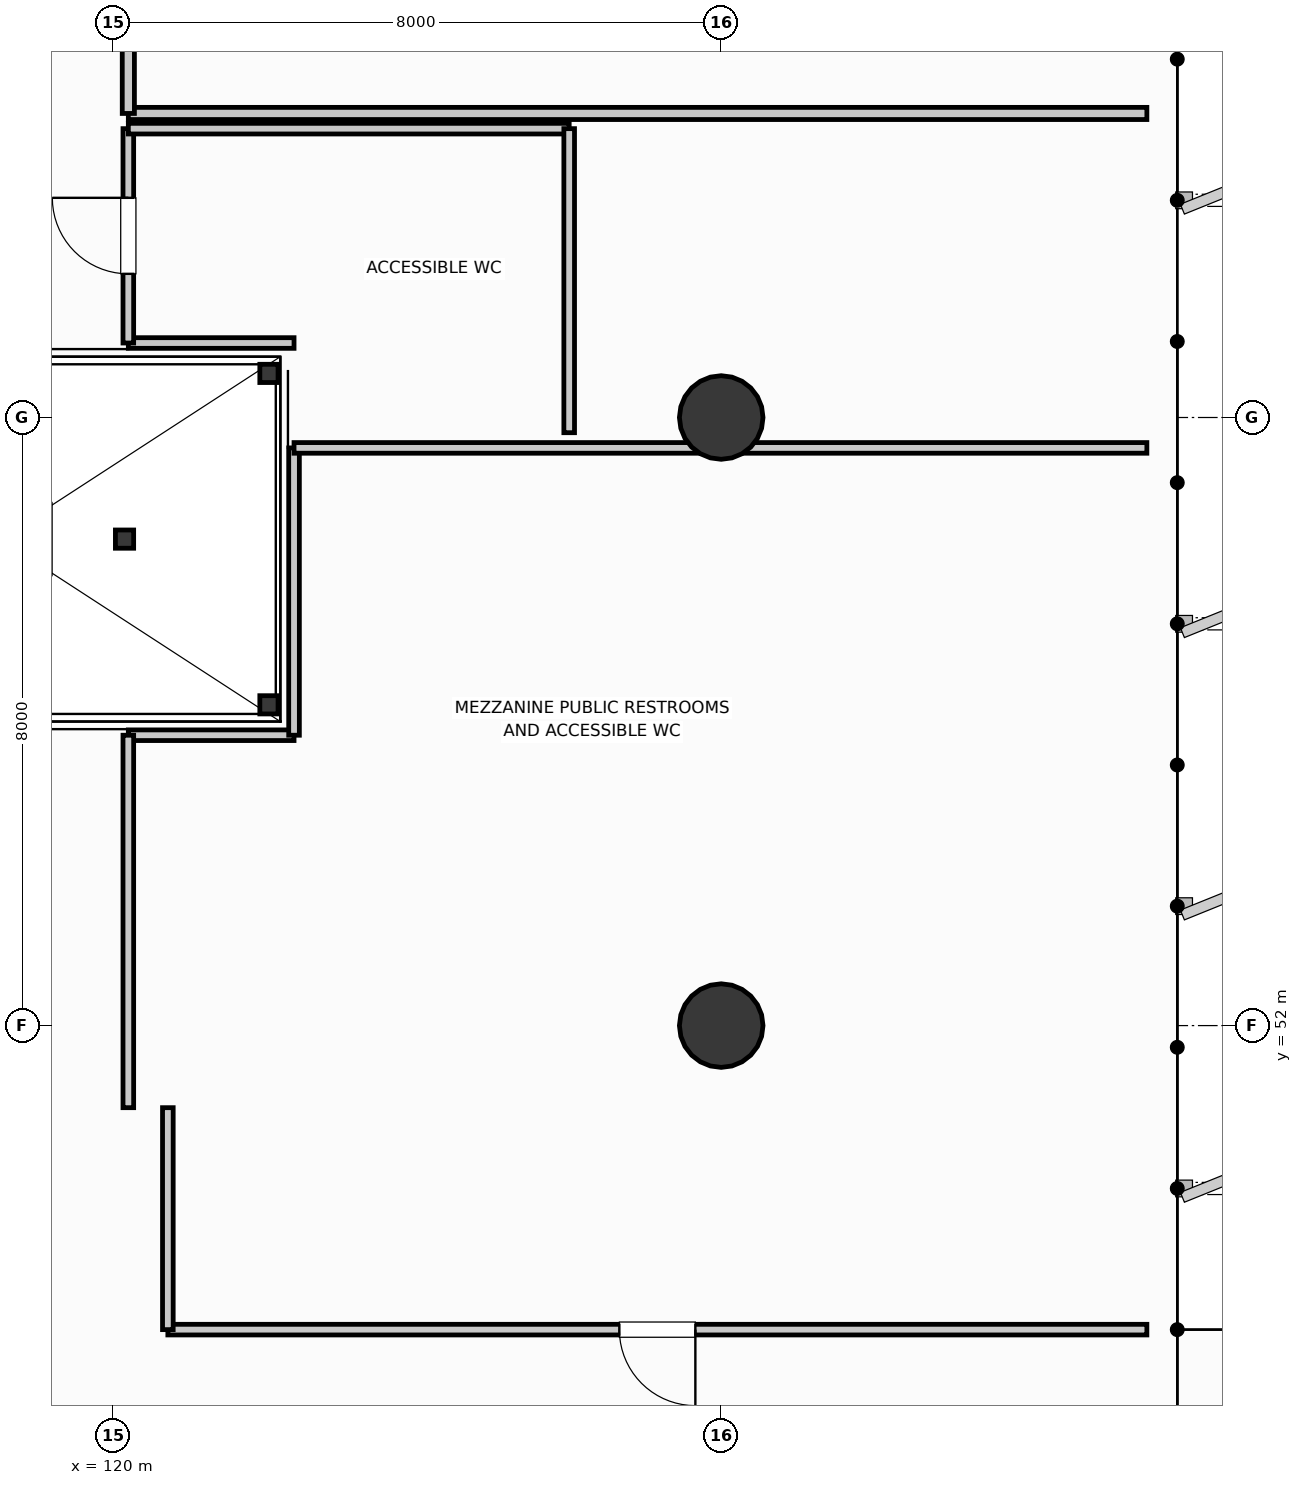
"""IFC4 building model, lengths in metres.
Left out: names, types, materials, properties, quantities, classifications, styles, units other than length and angle.
Written with IfcOpenShell. Run it as: python <this file> out.ifc"""

import sys

from ifc_helpers import new_model, si_unit, direction, frame, frame_2d, origin, origin_2d, place, context, subcontext, project, spatial, rectangle, circle, i_section, extrude, element, fill, save


model = new_model("IFC4")
c1 = context("Model", 3, precision=1e-05, world=origin(), true_north=direction((0.0, 1.0)))
c2 = subcontext(c1, "Body", "Model", "MODEL_VIEW")
j1 = project(units=[si_unit("LENGTHUNIT", "METRE"), si_unit("PLANEANGLEUNIT", "RADIAN")], contexts=[c1])
p1 = place(None, origin())
s1 = spatial("IfcSite", under=j1, at=p1, CompositionType="ELEMENT")
p2 = place(p1, origin())
s2 = spatial("IfcBuilding", under=s1, at=p2, CompositionType="ELEMENT")
p3 = place(p2, frame((0.0, 0.0, 6.0)))
s3 = spatial("IfcBuildingStorey", under=s2, at=p3, CompositionType="ELEMENT", Elevation=6.0)
for number, where, z_axis, x_axis in (
    (1, (128.0, 52.0, 0.0), (0.0, 0.0, 1.0), (1.0, 0.0, 0.0)),
    (2, (128.0, 60.0, 0.0), (0.0, 0.0, 1.0), (1.0, 0.0, 0.0)),
):
    element("IfcColumn", number, at=place(p3, frame(where, z_axis=z_axis, x_axis=x_axis)), inside=s3, PredefinedType="COLUMN", context=c2, shape_type="SweptSolid", body=[
        extrude(circle(Radius=0.55, at=origin_2d()), origin(), (0.0, 0.0, 1.0), 5.4),
    ])
for number, where, z_axis, x_axis in (
    (3, (122.05, 56.22, 0.0), (0.0, 0.0, 1.0), (1.0, 0.0, 0.0)),
    (4, (122.05, 60.58, 0.0), (0.0, 0.0, 1.0), (1.0, 0.0, 0.0)),
    (5, (120.15, 58.4, 0.0), (0.0, 0.0, 1.0), (1.0, 0.0, 0.0)),
):
    element("IfcColumn", number, at=place(p3, frame(where, z_axis=z_axis, x_axis=x_axis)), inside=s3, PredefinedType="COLUMN", context=c2, shape_type="SweptSolid", body=[
        extrude(i_section(OverallWidth=0.24, OverallDepth=0.24, WebThickness=0.01, FlangeThickness=0.017, FilletRadius=0.021, at=origin_2d()), origin(), (0.0, 0.0, 1.0), 2.7),
    ])
p4 = place(p3, frame((120.2, 55.82, 0.0), z_axis=(0.0, 0.0, 1.0), x_axis=(1.0, 0.0, 0.0)))
e6 = element("IfcWall", 6, at=p4, inside=s3, PredefinedType="PARTITIONING", context=c2, shape_type="SweptSolid", body=[
    extrude(rectangle(XDim=2.18, YDim=0.14, at=frame_2d((1.09, 0.0))), origin(), (0.0, 0.0, 1.0), 5.02),
])
p5 = place(p3, frame((122.38, 55.82, 0.0), z_axis=(0.0, 0.0, 1.0), x_axis=(0.0, 1.0, 0.0)))
e7 = element("IfcWall", 7, at=p5, inside=s3, PredefinedType="PARTITIONING", context=c2, shape_type="SweptSolid", body=[
    extrude(rectangle(XDim=3.78, YDim=0.14, at=frame_2d((1.89, 0.0))), origin(), (0.0, 0.0, 1.0), 5.02),
])
p6 = place(p3, frame((122.38, 59.6, 0.0), z_axis=(0.0, 0.0, 1.0), x_axis=(1.0, 0.0, 0.0)))
e8 = element("IfcWall", 8, at=p6, inside=s3, PredefinedType="PARTITIONING", context=c2, shape_type="SweptSolid", body=[
    extrude(rectangle(XDim=11.22, YDim=0.14, at=frame_2d((5.61, 0.0))), origin(), (0.0, 0.0, 1.0), 4.215),
])
p7 = place(p3, frame((133.6, 48.0, 0.0), z_axis=(0.0, 0.0, 1.0), x_axis=(-1.0, 0.0, 0.0)))
e9 = element("IfcWall", 9, at=p7, inside=s3, PredefinedType="PARTITIONING", context=c2, shape_type="SweptSolid", body=[
    extrude(rectangle(XDim=12.88, YDim=0.14, at=frame_2d((6.44, 0.0))), origin(), (0.0, 0.0, 1.0), 4.215),
])
p8 = place(p7, frame((5.94, 0.0, 0.0)))
e10 = element("IfcOpeningElement", 10, at=p8, cuts=e9, PredefinedType="OPENING", context=c2, shape_type="SweptSolid", body=[
    extrude(rectangle(XDim=1.0, YDim=2.15, at=frame_2d((0.5, 1.075))), frame((0.0, 0.08, 0.0), z_axis=(0.0, -1.0, 0.0), x_axis=(1.0, 0.0, 0.0)), (0.0, 0.0, 1.0), 0.16),
])
p9 = place(p3, frame((120.72, 48.0, 0.0), z_axis=(0.0, 0.0, 1.0), x_axis=(0.0, 1.0, 0.0)))
e11 = element("IfcWall", 11, at=p9, inside=s3, PredefinedType="PARTITIONING", context=c2, shape_type="SweptSolid", body=[
    extrude(rectangle(XDim=2.92, YDim=0.14, at=frame_2d((1.46, 0.0))), origin(), (0.0, 0.0, 1.0), 5.02),
])
p10 = place(p3, frame((120.2, 50.92, 0.0), z_axis=(0.0, 0.0, 1.0), x_axis=(0.0, 1.0, 0.0)))
e12 = element("IfcWall", 12, at=p10, inside=s3, PredefinedType="PARTITIONING", context=c2, shape_type="SweptSolid", body=[
    extrude(rectangle(XDim=4.9, YDim=0.14, at=frame_2d((2.45, 0.0))), origin(), (0.0, 0.0, 1.0), 3.565),
])
p11 = place(p3, frame((122.38, 60.98, 0.0), z_axis=(0.0, 0.0, 1.0), x_axis=(-1.0, 0.0, 0.0)))
e13 = element("IfcWall", 13, at=p11, inside=s3, PredefinedType="PARTITIONING", context=c2, shape_type="SweptSolid", body=[
    extrude(rectangle(XDim=2.18, YDim=0.14, at=frame_2d((1.09, 0.0))), origin(), (0.0, 0.0, 1.0), 5.02),
])
p12 = place(p3, frame((120.2, 60.98, 0.0), z_axis=(0.0, 0.0, 1.0), x_axis=(0.0, 1.0, 0.0)))
e14 = element("IfcWall", 14, at=p12, inside=s3, PredefinedType="PARTITIONING", context=c2, shape_type="SweptSolid", body=[
    extrude(rectangle(XDim=2.82, YDim=0.14, at=frame_2d((1.41, 0.0))), origin(), (0.0, 0.0, 1.0), 5.02),
])
p13 = place(p12, frame((0.91, 0.0, 0.0)))
e15 = element("IfcOpeningElement", 15, at=p13, cuts=e14, PredefinedType="OPENING", context=c2, shape_type="SweptSolid", body=[
    extrude(rectangle(XDim=1.0, YDim=2.15, at=frame_2d((0.5, 1.075))), frame((0.0, 0.08, 0.0), z_axis=(0.0, -1.0, 0.0), x_axis=(1.0, 0.0, 0.0)), (0.0, 0.0, 1.0), 0.16),
])
p14 = place(p3, frame((120.2, 63.8, 0.0), z_axis=(0.0, 0.0, 1.0), x_axis=(1.0, 0.0, 0.0)))
e16 = element("IfcWall", 16, at=p14, inside=s3, PredefinedType="PARTITIONING", context=c2, shape_type="SweptSolid", body=[
    extrude(rectangle(XDim=5.8, YDim=0.14, at=frame_2d((2.9, 0.0))), origin(), (0.0, 0.0, 1.0), 5.02),
])
p15 = place(p3, frame((126.0, 63.8, 0.0), z_axis=(0.0, 0.0, 1.0), x_axis=(0.0, -1.0, 0.0)))
e17 = element("IfcWall", 17, at=p15, inside=s3, PredefinedType="PARTITIONING", context=c2, shape_type="SweptSolid", body=[
    extrude(rectangle(XDim=4.0, YDim=0.14, at=frame_2d((2.0, 0.0))), origin(), (0.0, 0.0, 1.0), 5.02),
])
p16 = place(p3, frame((133.6, 64.0, 0.0), z_axis=(0.0, 0.0, 1.0), x_axis=(-1.0, 0.0, 0.0)))
e18 = element("IfcWall", 18, at=p16, inside=s3, PredefinedType="PARTITIONING", context=c2, shape_type="SweptSolid", body=[
    extrude(rectangle(XDim=13.4, YDim=0.16, at=frame_2d((6.7, 0.0))), origin(), (0.0, 0.0, 1.0), 4.315),
])
p17 = place(p3, frame((120.2, 64.0, 0.0), z_axis=(0.0, 0.0, 1.0), x_axis=(0.0, 1.0, 0.0)))
e19 = element("IfcWall", 19, at=p17, inside=s3, PredefinedType="PARTITIONING", context=c2, shape_type="SweptSolid", body=[
    extrude(rectangle(XDim=21.6, YDim=0.16, at=frame_2d((10.8, 0.0))), origin(), (0.0, 0.0, 1.0), 4.215),
])
p18 = place(p17, frame((9.9, 0.0, 0.0)))
e20 = element("IfcOpeningElement", 20, at=p18, cuts=e19, PredefinedType="OPENING", context=c2, shape_type="SweptSolid", body=[
    extrude(rectangle(XDim=1.8, YDim=2.25, at=frame_2d((0.9, 1.125))), frame((0.0, 0.09, 0.0), z_axis=(0.0, -1.0, 0.0), x_axis=(1.0, 0.0, 0.0)), (0.0, 0.0, 1.0), 0.18),
])
p19 = place(p8, origin())
e21 = element("IfcDoor", 21, at=p19, inside=s3, OperationType="SINGLE_SWING_LEFT", PredefinedType="DOOR", context=c2, shape_type="SweptSolid", body=[
    extrude(rectangle(XDim=1.0, YDim=2.15, at=frame_2d((0.5, 1.075))), frame((0.0, 0.025, 0.0), z_axis=(0.0, -1.0, 0.0), x_axis=(1.0, 0.0, 0.0)), (0.0, 0.0, 1.0), 0.05),
])
fill(e10, e21)
p20 = place(p13, origin())
e22 = element("IfcDoor", 22, at=p20, inside=s3, OperationType="SINGLE_SWING_RIGHT", PredefinedType="DOOR", context=c2, shape_type="SweptSolid", body=[
    extrude(rectangle(XDim=1.0, YDim=2.15, at=frame_2d((0.5, 1.075))), frame((0.0, 0.025, 0.0), z_axis=(0.0, -1.0, 0.0), x_axis=(1.0, 0.0, 0.0)), (0.0, 0.0, 1.0), 0.05),
])
fill(e15, e22)
save(model, sys.argv[1])
